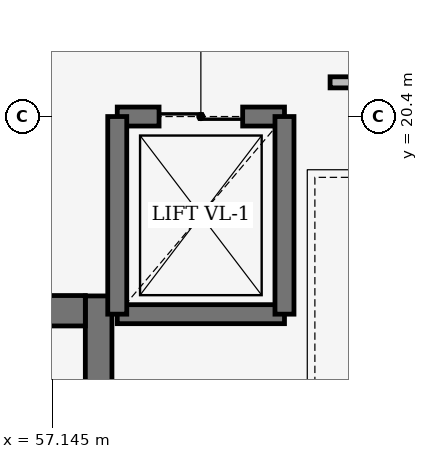
"""IFC4 building model, lengths in metres.
Left out: names, types, materials, properties, quantities, classifications, styles, units other than length and angle.
Written with IfcOpenShell. Run it as: python <this file> out.ifc"""

import sys

from ifc_helpers import new_model, si_unit, direction, frame, frame_2d, origin, place, context, subcontext, project, spatial, rectangle, extrude, element, fill, save


model = new_model("IFC4")
c1 = context("Model", 3, precision=1e-05, world=origin(), true_north=direction((0.0, 1.0)))
c2 = subcontext(c1, "Body", "Model", "MODEL_VIEW")
j1 = project(units=[si_unit("LENGTHUNIT", "METRE"), si_unit("PLANEANGLEUNIT", "RADIAN")], contexts=[c1])
p1 = place(None, origin())
s1 = spatial("IfcSite", under=j1, at=p1, CompositionType="ELEMENT")
p2 = place(p1, origin())
s2 = spatial("IfcBuilding", under=s1, at=p2, CompositionType="ELEMENT")
p3 = place(p2, frame((0.0, 0.0, 9.0)))
s3 = spatial("IfcBuildingStorey", under=s2, at=p3, CompositionType="ELEMENT", Elevation=9.0)
p4 = place(p3, frame((57.755, 13.45, 0.0), z_axis=(0.0, 0.0, 1.0), x_axis=(0.0, 1.0, 0.0)))
e1 = element("IfcWall", 1, at=p4, inside=s3, PredefinedType="SHEAR", context=c2, shape_type="SweptSolid", body=[
    extrude(rectangle(XDim=4.59, YDim=0.35, at=frame_2d((2.295, 0.0))), origin(), (0.0, 0.0, 1.0), 3.96),
])
p5 = place(p3, frame((49.6, 17.845, 0.0), z_axis=(0.0, 0.0, 1.0), x_axis=(1.0, 0.0, 0.0)))
e2 = element("IfcWall", 2, at=p5, inside=s3, PredefinedType="SHEAR", context=c2, shape_type="SweptSolid", body=[
    extrude(rectangle(XDim=7.98, YDim=0.4, at=frame_2d((3.99, 0.0))), origin(), (0.0, 0.0, 1.0), 3.96),
])
p6 = place(p3, frame((58.0, 17.8, 0.0), z_axis=(0.0, 0.0, 1.0), x_axis=(1.0, 0.0, 0.0)))
e3 = element("IfcWall", 3, at=p6, inside=s3, PredefinedType="SHEAR", context=c2, shape_type="SweptSolid", body=[
    extrude(rectangle(XDim=2.2, YDim=0.25, at=frame_2d((1.1, 0.0))), origin(), (0.0, 0.0, 1.0), 3.96),
])
p7 = place(p3, frame((58.0, 20.4, 0.0), z_axis=(0.0, 0.0, 1.0), x_axis=(1.0, 0.0, 0.0)))
e4 = element("IfcWall", 4, at=p7, inside=s3, PredefinedType="SHEAR", context=c2, shape_type="SweptSolid", body=[
    extrude(rectangle(XDim=2.2, YDim=0.25, at=frame_2d((1.1, 0.0))), origin(), (0.0, 0.0, 1.0), 3.96),
])
p8 = place(p7, frame((0.55, 0.0, 0.0)))
e5 = element("IfcOpeningElement", 5, at=p8, cuts=e4, PredefinedType="OPENING", context=c2, shape_type="SweptSolid", body=[
    extrude(rectangle(XDim=1.1, YDim=2.2, at=frame_2d((0.55, 1.1))), frame((0.0, 0.135, 0.0), z_axis=(0.0, -1.0, 0.0), x_axis=(1.0, 0.0, 0.0)), (0.0, 0.0, 1.0), 0.27),
])
for number, where, z_axis, x_axis in (
    (6, (58.0, 17.8, 0.0), (0.0, 0.0, 1.0), (0.0, 1.0, 0.0)),
    (7, (60.2, 17.8, 0.0), (0.0, 0.0, 1.0), (0.0, 1.0, 0.0)),
):
    element("IfcWall", number, at=place(p3, frame(where, z_axis=z_axis, x_axis=x_axis)), inside=s3, PredefinedType="SHEAR", context=c2, shape_type="SweptSolid", body=[
        extrude(rectangle(XDim=2.6, YDim=0.25, at=frame_2d((1.3, 0.0))), origin(), (0.0, 0.0, 1.0), 3.96),
    ])
p9 = place(p3, frame((60.8, 20.85, 0.0), z_axis=(0.0, 0.0, 1.0), x_axis=(1.0, 0.0, 0.0)))
e8 = element("IfcWall", 8, at=p9, inside=s3, PredefinedType="PARTITIONING", context=c2, shape_type="SweptSolid", body=[
    extrude(rectangle(XDim=8.8, YDim=0.146, at=frame_2d((4.4, 0.0))), origin(), (0.0, 0.0, 1.0), 3.94),
])
p10 = place(p9, frame((3.81, 0.0, 0.0)))
e9 = element("IfcOpeningElement", 9, at=p10, cuts=e8, PredefinedType="OPENING", context=c2, shape_type="SweptSolid", body=[
    extrude(rectangle(XDim=1.18, YDim=2.1, at=frame_2d((0.59, 1.05))), frame((0.0, 0.083, 0.0), z_axis=(0.0, -1.0, 0.0), x_axis=(1.0, 0.0, 0.0)), (0.0, 0.0, 1.0), 0.166),
])
p11 = place(p8, origin())
e10 = element("IfcDoor", 10, at=p11, inside=s3, OperationType="DOUBLE_DOOR_SLIDING", PredefinedType="DOOR", context=c2, shape_type="SweptSolid", body=[
    extrude(rectangle(XDim=1.1, YDim=2.2, at=frame_2d((0.55, 1.1))), frame((0.0, 0.025, 0.0), z_axis=(0.0, -1.0, 0.0), x_axis=(1.0, 0.0, 0.0)), (0.0, 0.0, 1.0), 0.05),
])
fill(e5, e10)
save(model, sys.argv[1])
